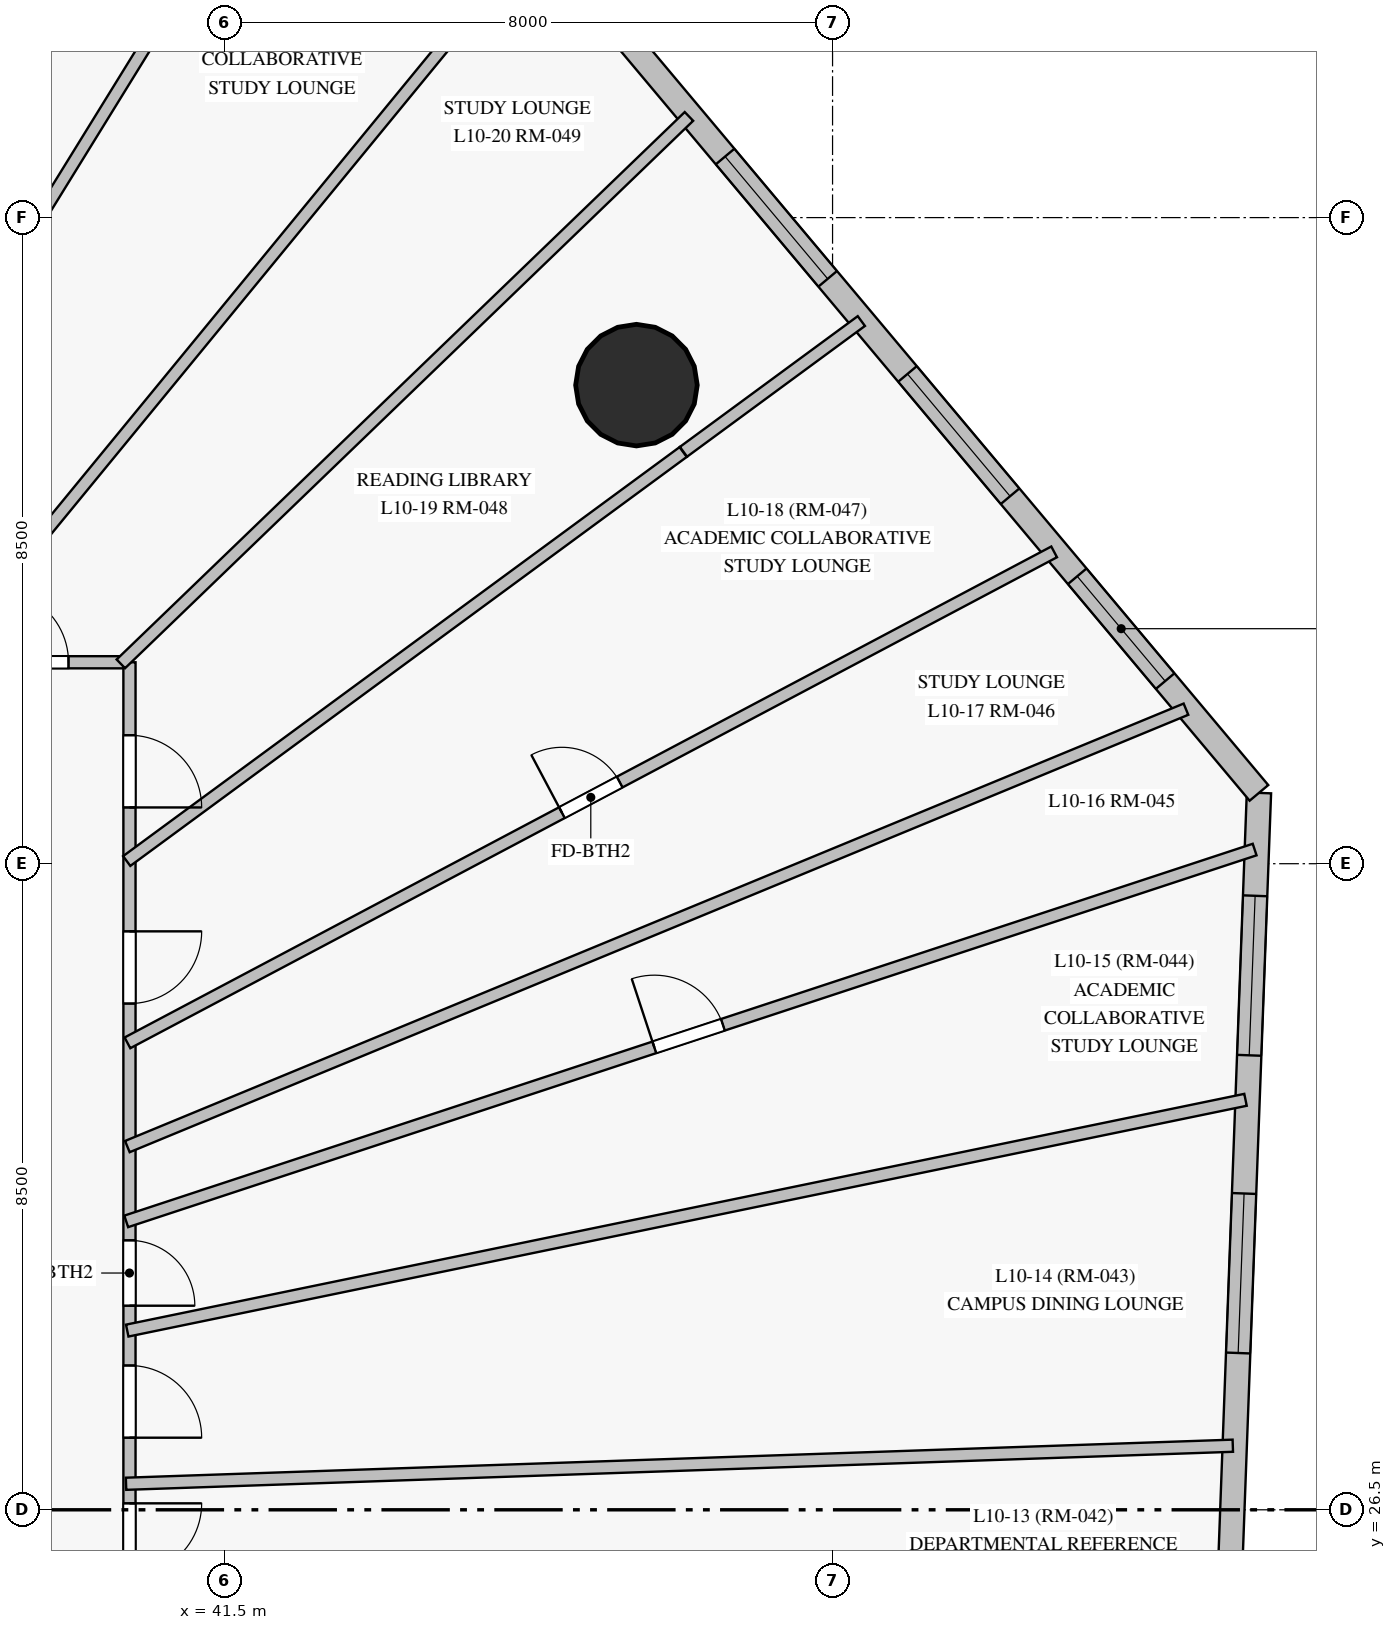
"""IFC4 building model, lengths in metres.
Left out: names, types, materials, properties, quantities, classifications, styles, units other than length and angle.
Written with IfcOpenShell. Run it as: python <this file> out.ifc"""

import sys

from ifc_helpers import new_model, si_unit, direction, frame, frame_2d, origin, origin_with_axes, origin_2d, place, context, subcontext, project, spatial, rectangle, circle, extrude, source, transform, mapped, element, fill, save


model = new_model("IFC4")
c1 = context("Model", 3, precision=1e-05, world=origin(), true_north=direction((0.0, 1.0)))
c2 = subcontext(c1, "Body", "Model", "MODEL_VIEW")
j1 = project(units=[si_unit("LENGTHUNIT", "METRE"), si_unit("PLANEANGLEUNIT", "RADIAN")], contexts=[c1])
p1 = place(None, origin())
s1 = spatial("IfcSite", under=j1, at=p1, CompositionType="ELEMENT")
p2 = place(p1, origin())
s2 = spatial("IfcBuilding", under=s1, at=p2, CompositionType="ELEMENT")
p3 = place(p2, frame((0.0, 0.0, 40.9)))
s3 = spatial("IfcBuildingStorey", under=s2, at=p3, CompositionType="ELEMENT", Elevation=40.9)
m1 = source(origin_with_axes(), c2, "Body", "SweptSolid", [
    extrude(circle(Radius=0.8, at=origin_2d()), origin(), (0.0, 0.0, 1.0), 3.6),
])
p4 = place(p3, frame((46.92, 41.296, 0.0), z_axis=(0.0, 0.0, 1.0), x_axis=(1.0, 0.0, 0.0)))
e1 = element("IfcColumn", 1, at=p4, inside=s3, PredefinedType="COLUMN", context=c2, shape_type="MappedRepresentation", body=[
    mapped(m1, transform((0.0, 0.0, 0.0), scale=1.0)),
])
p5 = place(p3, frame((54.716, 25.32, 0.0), z_axis=(0.0, 0.0, 1.0), x_axis=(0.037084791295, 0.99931212254, 0.0)))
e2 = element("IfcWall", 2, at=p5, inside=s3, PredefinedType="SOLIDWALL", context=c2, shape_type="SweptSolid", body=[
    extrude(rectangle(XDim=10.619, YDim=0.32, at=frame_2d((5.31, 0.0))), origin(), (0.0, 0.0, 1.0), 3.35),
])
p6 = place(p5, frame((3.245, 0.0, 0.85)))
e3 = element("IfcOpeningElement", 3, at=p6, cuts=e2, PredefinedType="OPENING", context=c2, shape_type="SweptSolid", body=[
    extrude(rectangle(XDim=2.1, YDim=1.95, at=frame_2d((1.05, 0.975))), frame((0.0, 0.17, 0.0), z_axis=(0.0, -1.0, 0.0), x_axis=(1.0, 0.0, 0.0)), (0.0, 0.0, 1.0), 0.34),
])
p7 = place(p5, frame((7.164, 0.0, 0.85)))
e4 = element("IfcOpeningElement", 4, at=p7, cuts=e2, PredefinedType="OPENING", context=c2, shape_type="SweptSolid", body=[
    extrude(rectangle(XDim=2.1, YDim=1.95, at=frame_2d((1.05, 0.975))), frame((0.0, 0.17, 0.0), z_axis=(0.0, -1.0, 0.0), x_axis=(1.0, 0.0, 0.0)), (0.0, 0.0, 1.0), 0.34),
])
p8 = place(p3, frame((55.11, 35.932, 0.0), z_axis=(0.0, 0.0, 1.0), x_axis=(-0.642710935311, 0.766108774021, 0.0)))
e5 = element("IfcWall", 5, at=p8, inside=s3, PredefinedType="SOLIDWALL", context=c2, shape_type="SweptSolid", body=[
    extrude(rectangle(XDim=13.212, YDim=0.32, at=frame_2d((6.606, 0.0))), origin(), (0.0, 0.0, 1.0), 3.35),
])
p9 = place(p8, frame((1.92, 0.0, 0.85)))
e6 = element("IfcOpeningElement", 6, at=p9, cuts=e5, PredefinedType="OPENING", context=c2, shape_type="SweptSolid", body=[
    extrude(rectangle(XDim=1.8, YDim=1.85, at=frame_2d((0.9, 0.925))), frame((0.0, 0.17, 0.0), z_axis=(0.0, -1.0, 0.0), x_axis=(1.0, 0.0, 0.0)), (0.0, 0.0, 1.0), 0.34),
])
p10 = place(p8, frame((5.094, 0.0, 0.85)))
e7 = element("IfcOpeningElement", 7, at=p10, cuts=e5, PredefinedType="OPENING", context=c2, shape_type="SweptSolid", body=[
    extrude(rectangle(XDim=2.1, YDim=1.95, at=frame_2d((1.05, 0.975))), frame((0.0, 0.17, 0.0), z_axis=(0.0, -1.0, 0.0), x_axis=(1.0, 0.0, 0.0)), (0.0, 0.0, 1.0), 0.34),
])
p11 = place(p8, frame((8.828, 0.0, 0.85)))
e8 = element("IfcOpeningElement", 8, at=p11, cuts=e5, PredefinedType="OPENING", context=c2, shape_type="SweptSolid", body=[
    extrude(rectangle(XDim=2.1, YDim=1.95, at=frame_2d((1.05, 0.975))), frame((0.0, 0.17, 0.0), z_axis=(0.0, -1.0, 0.0), x_axis=(1.0, 0.0, 0.0)), (0.0, 0.0, 1.0), 0.34),
])
p12 = place(p3, frame((10.5, 37.65, 0.0), z_axis=(0.0, 0.0, 1.0), x_axis=(1.0, 0.0, 0.0)))
e9 = element("IfcWall", 9, at=p12, inside=s3, PredefinedType="PARTITIONING", context=c2, shape_type="SweptSolid", body=[
    extrude(rectangle(XDim=29.75, YDim=0.16, at=frame_2d((14.875, 0.0))), origin(), (0.0, 0.0, 1.0), 2.75),
])
p13 = place(p12, frame((27.998, 0.0, 0.0)))
e10 = element("IfcOpeningElement", 10, at=p13, cuts=e9, PredefinedType="OPENING", context=c2, shape_type="SweptSolid", body=[
    extrude(rectangle(XDim=0.95, YDim=2.15, at=frame_2d((0.475, 1.075))), frame((0.0, 0.09, 0.0), z_axis=(0.0, -1.0, 0.0), x_axis=(1.0, 0.0, 0.0)), (0.0, 0.0, 1.0), 0.18),
])
p14 = place(p12, frame((25.599, 0.0, 0.0)))
e11 = element("IfcOpeningElement", 11, at=p14, cuts=e9, PredefinedType="OPENING", context=c2, shape_type="SweptSolid", body=[
    extrude(rectangle(XDim=0.95, YDim=2.15, at=frame_2d((0.475, 1.075))), frame((0.0, 0.09, 0.0), z_axis=(0.0, -1.0, 0.0), x_axis=(1.0, 0.0, 0.0)), (0.0, 0.0, 1.0), 0.18),
])
p15 = place(p12, frame((23.319, 0.0, 0.0)))
e12 = element("IfcOpeningElement", 12, at=p15, cuts=e9, PredefinedType="OPENING", context=c2, shape_type="SweptSolid", body=[
    extrude(rectangle(XDim=0.95, YDim=2.15, at=frame_2d((0.475, 1.075))), frame((0.0, 0.09, 0.0), z_axis=(0.0, -1.0, 0.0), x_axis=(1.0, 0.0, 0.0)), (0.0, 0.0, 1.0), 0.18),
])
p16 = place(p12, frame((20.597, 0.0, 0.0)))
e13 = element("IfcOpeningElement", 13, at=p16, cuts=e9, PredefinedType="OPENING", context=c2, shape_type="SweptSolid", body=[
    extrude(rectangle(XDim=0.95, YDim=2.15, at=frame_2d((0.475, 1.075))), frame((0.0, 0.09, 0.0), z_axis=(0.0, -1.0, 0.0), x_axis=(1.0, 0.0, 0.0)), (0.0, 0.0, 1.0), 0.18),
])
p17 = place(p12, frame((18.611, 0.0, 0.0)))
e14 = element("IfcOpeningElement", 14, at=p17, cuts=e9, PredefinedType="OPENING", context=c2, shape_type="SweptSolid", body=[
    extrude(rectangle(XDim=0.95, YDim=2.15, at=frame_2d((0.475, 1.075))), frame((0.0, 0.09, 0.0), z_axis=(0.0, -1.0, 0.0), x_axis=(1.0, 0.0, 0.0)), (0.0, 0.0, 1.0), 0.18),
])
p18 = place(p12, frame((16.123, 0.0, 0.0)))
e15 = element("IfcOpeningElement", 15, at=p18, cuts=e9, PredefinedType="OPENING", context=c2, shape_type="SweptSolid", body=[
    extrude(rectangle(XDim=0.95, YDim=2.15, at=frame_2d((0.475, 1.075))), frame((0.0, 0.09, 0.0), z_axis=(0.0, -1.0, 0.0), x_axis=(1.0, 0.0, 0.0)), (0.0, 0.0, 1.0), 0.18),
])
p19 = place(p12, frame((12.996, 0.0, 0.0)))
e16 = element("IfcOpeningElement", 16, at=p19, cuts=e9, PredefinedType="OPENING", context=c2, shape_type="SweptSolid", body=[
    extrude(rectangle(XDim=0.95, YDim=2.15, at=frame_2d((0.475, 1.075))), frame((0.0, 0.09, 0.0), z_axis=(0.0, -1.0, 0.0), x_axis=(1.0, 0.0, 0.0)), (0.0, 0.0, 1.0), 0.18),
])
p20 = place(p12, frame((10.46, 0.0, 0.0)))
e17 = element("IfcOpeningElement", 17, at=p20, cuts=e9, PredefinedType="OPENING", context=c2, shape_type="SweptSolid", body=[
    extrude(rectangle(XDim=0.95, YDim=2.15, at=frame_2d((0.475, 1.075))), frame((0.0, 0.09, 0.0), z_axis=(0.0, -1.0, 0.0), x_axis=(1.0, 0.0, 0.0)), (0.0, 0.0, 1.0), 0.18),
])
p21 = place(p12, frame((7.876, 0.0, 0.0)))
e18 = element("IfcOpeningElement", 18, at=p21, cuts=e9, PredefinedType="OPENING", context=c2, shape_type="SweptSolid", body=[
    extrude(rectangle(XDim=0.95, YDim=2.15, at=frame_2d((0.475, 1.075))), frame((0.0, 0.09, 0.0), z_axis=(0.0, -1.0, 0.0), x_axis=(1.0, 0.0, 0.0)), (0.0, 0.0, 1.0), 0.18),
])
p22 = place(p12, frame((6.748, 0.0, 0.0)))
e19 = element("IfcOpeningElement", 19, at=p22, cuts=e9, PredefinedType="OPENING", context=c2, shape_type="SweptSolid", body=[
    extrude(rectangle(XDim=0.95, YDim=2.15, at=frame_2d((0.475, 1.075))), frame((0.0, 0.09, 0.0), z_axis=(0.0, -1.0, 0.0), x_axis=(1.0, 0.0, 0.0)), (0.0, 0.0, 1.0), 0.18),
])
p23 = place(p12, frame((5.623, 0.0, 0.0)))
e20 = element("IfcOpeningElement", 20, at=p23, cuts=e9, PredefinedType="OPENING", context=c2, shape_type="SweptSolid", body=[
    extrude(rectangle(XDim=0.95, YDim=2.15, at=frame_2d((0.475, 1.075))), frame((0.0, 0.09, 0.0), z_axis=(0.0, -1.0, 0.0), x_axis=(1.0, 0.0, 0.0)), (0.0, 0.0, 1.0), 0.18),
])
p24 = place(p3, frame((40.25, 37.65, 0.0), z_axis=(0.0, 0.0, 1.0), x_axis=(0.0, -1.0, 0.0)))
e21 = element("IfcWall", 21, at=p24, inside=s3, PredefinedType="PARTITIONING", context=c2, shape_type="SweptSolid", body=[
    extrude(rectangle(XDim=22.3, YDim=0.16, at=frame_2d((11.15, 0.0))), origin(), (0.0, 0.0, 1.0), 2.75),
])
p25 = place(p24, frame((16.34, 0.0, 0.0)))
e22 = element("IfcOpeningElement", 22, at=p25, cuts=e21, PredefinedType="OPENING", context=c2, shape_type="SweptSolid", body=[
    extrude(rectangle(XDim=0.95, YDim=2.15, at=frame_2d((0.475, 1.075))), frame((0.0, 0.09, 0.0), z_axis=(0.0, -1.0, 0.0), x_axis=(1.0, 0.0, 0.0)), (0.0, 0.0, 1.0), 0.18),
])
p26 = place(p24, frame((14.02, 0.0, 0.0)))
e23 = element("IfcOpeningElement", 23, at=p26, cuts=e21, PredefinedType="OPENING", context=c2, shape_type="SweptSolid", body=[
    extrude(rectangle(XDim=0.95, YDim=2.15, at=frame_2d((0.475, 1.075))), frame((0.0, 0.09, 0.0), z_axis=(0.0, -1.0, 0.0), x_axis=(1.0, 0.0, 0.0)), (0.0, 0.0, 1.0), 0.18),
])
p27 = place(p24, frame((11.065, 0.0, 0.0)))
e24 = element("IfcOpeningElement", 24, at=p27, cuts=e21, PredefinedType="OPENING", context=c2, shape_type="SweptSolid", body=[
    extrude(rectangle(XDim=0.95, YDim=2.15, at=frame_2d((0.475, 1.075))), frame((0.0, 0.09, 0.0), z_axis=(0.0, -1.0, 0.0), x_axis=(1.0, 0.0, 0.0)), (0.0, 0.0, 1.0), 0.18),
])
p28 = place(p24, frame((9.252, 0.0, 0.0)))
e25 = element("IfcOpeningElement", 25, at=p28, cuts=e21, PredefinedType="OPENING", context=c2, shape_type="SweptSolid", body=[
    extrude(rectangle(XDim=0.95, YDim=2.15, at=frame_2d((0.475, 1.075))), frame((0.0, 0.09, 0.0), z_axis=(0.0, -1.0, 0.0), x_axis=(1.0, 0.0, 0.0)), (0.0, 0.0, 1.0), 0.18),
])
p29 = place(p24, frame((3.54, 0.0, 0.0)))
e26 = element("IfcOpeningElement", 26, at=p29, cuts=e21, PredefinedType="OPENING", context=c2, shape_type="SweptSolid", body=[
    extrude(rectangle(XDim=0.95, YDim=2.15, at=frame_2d((0.475, 1.075))), frame((0.0, 0.09, 0.0), z_axis=(0.0, -1.0, 0.0), x_axis=(1.0, 0.0, 0.0)), (0.0, 0.0, 1.0), 0.18),
])
p30 = place(p24, frame((0.96, 0.0, 0.0)))
e27 = element("IfcOpeningElement", 27, at=p30, cuts=e21, PredefinedType="OPENING", context=c2, shape_type="SweptSolid", body=[
    extrude(rectangle(XDim=0.95, YDim=2.15, at=frame_2d((0.475, 1.075))), frame((0.0, 0.09, 0.0), z_axis=(0.0, -1.0, 0.0), x_axis=(1.0, 0.0, 0.0)), (0.0, 0.0, 1.0), 0.18),
])
p31 = place(p24, frame((12.837, 0.0, 0.0)))
e28 = element("IfcOpeningElement", 28, at=p31, cuts=e21, PredefinedType="OPENING", context=c2, shape_type="SweptSolid", body=[
    extrude(rectangle(XDim=0.95, YDim=2.15, at=frame_2d((0.475, 1.075))), frame((0.0, 0.09, 0.0), z_axis=(0.0, -1.0, 0.0), x_axis=(1.0, 0.0, 0.0)), (0.0, 0.0, 1.0), 0.18),
])
p32 = place(p24, frame((17.465, 0.0, 0.0)))
e29 = element("IfcOpeningElement", 29, at=p32, cuts=e21, PredefinedType="OPENING", context=c2, shape_type="SweptSolid", body=[
    extrude(rectangle(XDim=0.95, YDim=2.15, at=frame_2d((0.475, 1.075))), frame((0.0, 0.09, 0.0), z_axis=(0.0, -1.0, 0.0), x_axis=(1.0, 0.0, 0.0)), (0.0, 0.0, 1.0), 0.18),
])
p33 = place(p24, frame((7.605, 0.0, 0.0)))
e30 = element("IfcOpeningElement", 30, at=p33, cuts=e21, PredefinedType="OPENING", context=c2, shape_type="SweptSolid", body=[
    extrude(rectangle(XDim=0.86, YDim=2.04, at=frame_2d((0.43, 1.02))), frame((0.0, 0.09, 0.0), z_axis=(0.0, -1.0, 0.0), x_axis=(1.0, 0.0, 0.0)), (0.0, 0.0, 1.0), 0.18),
])
p34 = place(p3, frame((40.207, 30.294, 0.0), z_axis=(0.0, 0.0, 1.0), x_axis=(0.949766327696, 0.31295993797, 0.0)))
e31 = element("IfcWall", 31, at=p34, inside=s3, PredefinedType="PARTITIONING", context=c2, shape_type="SweptSolid", body=[
    extrude(rectangle(XDim=15.631, YDim=0.16, at=frame_2d((7.815, 0.0))), origin(), (0.0, 0.0, 1.0), 3.35),
])
p35 = place(p34, frame((7.315, 0.0, 0.0)))
e32 = element("IfcOpeningElement", 32, at=p35, cuts=e31, PredefinedType="OPENING", context=c2, shape_type="SweptSolid", body=[
    extrude(rectangle(XDim=0.95, YDim=2.15, at=frame_2d((0.475, 1.075))), frame((0.0, 0.09, 0.0), z_axis=(0.0, -1.0, 0.0), x_axis=(1.0, 0.0, 0.0)), (0.0, 0.0, 1.0), 0.18),
])
p36 = place(p3, frame((40.222, 31.278, 0.0), z_axis=(0.0, 0.0, 1.0), x_axis=(0.924216059617, 0.381869971517, 0.0)))
e33 = element("IfcWall", 33, at=p36, inside=s3, PredefinedType="PARTITIONING", context=c2, shape_type="SweptSolid", body=[
    extrude(rectangle(XDim=15.069, YDim=0.16, at=frame_2d((7.535, 0.0))), origin(), (0.0, 0.0, 1.0), 3.35),
])
p37 = place(p3, frame((40.221, 28.857, 0.0), z_axis=(0.0, 0.0, 1.0), x_axis=(0.979362809726, 0.202110086154, 0.0)))
e34 = element("IfcWall", 34, at=p37, inside=s3, PredefinedType="PARTITIONING", context=c2, shape_type="SweptSolid", body=[
    extrude(rectangle(XDim=15.022, YDim=0.16, at=frame_2d((7.511, 0.0))), origin(), (0.0, 0.0, 1.0), 3.35),
])
p38 = place(p3, frame((40.205, 26.842, 0.0), z_axis=(0.0, 0.0, 1.0), x_axis=(0.999409219027, 0.034368778327, 0.0)))
e35 = element("IfcWall", 35, at=p38, inside=s3, PredefinedType="PARTITIONING", context=c2, shape_type="SweptSolid", body=[
    extrude(rectangle(XDim=14.569, YDim=0.16, at=frame_2d((7.285, 0.0))), origin(), (0.0, 0.0, 1.0), 3.35),
])
p39 = place(p3, frame((40.223, 32.643, 0.0), z_axis=(0.0, 0.0, 1.0), x_axis=(0.88365057227, 0.46814705609, 0.0)))
e36 = element("IfcWall", 36, at=p39, inside=s3, PredefinedType="PARTITIONING", context=c2, shape_type="SweptSolid", body=[
    extrude(rectangle(XDim=13.797, YDim=0.16, at=frame_2d((6.898, 0.0))), origin(), (0.0, 0.0, 1.0), 3.35),
])
p40 = place(p39, frame((6.469, 0.0, 0.0)))
e37 = element("IfcOpeningElement", 37, at=p40, cuts=e36, PredefinedType="OPENING", context=c2, shape_type="SweptSolid", body=[
    extrude(rectangle(XDim=0.86, YDim=2.04, at=frame_2d((0.43, 1.02))), frame((0.0, 0.09, 0.0), z_axis=(0.0, -1.0, 0.0), x_axis=(1.0, 0.0, 0.0)), (0.0, 0.0, 1.0), 0.18),
])
p41 = place(p3, frame((35.432, 37.612, 0.0), z_axis=(0.0, 0.0, 1.0), x_axis=(0.525422876005, 0.850841231588, 0.0)))
e38 = element("IfcWall", 38, at=p41, inside=s3, PredefinedType="PARTITIONING", context=c2, shape_type="SweptSolid", body=[
    extrude(rectangle(XDim=12.029, YDim=0.16, at=frame_2d((6.014, 0.0))), origin(), (0.0, 0.0, 1.0), 3.35),
])
p42 = place(p3, frame((37.704, 37.615, 0.0), z_axis=(0.0, 0.0, 1.0), x_axis=(0.634552182482, 0.772880021547, 0.0)))
e39 = element("IfcWall", 39, at=p42, inside=s3, PredefinedType="PARTITIONING", context=c2, shape_type="SweptSolid", body=[
    extrude(rectangle(XDim=11.624, YDim=0.16, at=frame_2d((5.812, 0.0))), origin(), (0.0, 0.0, 1.0), 3.35),
])
p43 = place(p3, frame((40.137, 37.629, 0.0), z_axis=(0.0, 0.0, 1.0), x_axis=(0.720098619119, 0.693871730757, 0.0)))
e40 = element("IfcWall", 40, at=p43, inside=s3, PredefinedType="PARTITIONING", context=c2, shape_type="SweptSolid", body=[
    extrude(rectangle(XDim=10.379, YDim=0.16, at=frame_2d((5.19, 0.0))), origin(), (0.0, 0.0, 1.0), 3.35),
])
p44 = place(p3, frame((40.214, 35.035, 0.0), z_axis=(0.0, 0.0, 1.0), x_axis=(0.805769809624, 0.59222885264, 0.0)))
e41 = element("IfcWall", 41, at=p44, inside=s3, PredefinedType="PARTITIONING", context=c2, shape_type="SweptSolid", body=[
    extrude(rectangle(XDim=9.086, YDim=0.16, at=frame_2d((4.543, 0.0))), origin(), (0.0, 0.0, 1.0), 3.35),
])
p45 = place(p3, frame((47.539, 40.419, 0.0), z_axis=(0.0, 0.0, 1.0), x_axis=(0.805763100635, 0.592237980592, 0.0)))
e42 = element("IfcWall", 42, at=p45, inside=s3, PredefinedType="PARTITIONING", context=c2, shape_type="SweptSolid", body=[
    extrude(rectangle(XDim=2.904, YDim=0.16, at=frame_2d((1.452, 0.0))), origin(), (0.0, 0.0, 1.0), 3.35),
])
m2 = source(origin_with_axes(), c2, "Body", "SweptSolid", [
    extrude(rectangle(XDim=2.1, YDim=1.95, at=frame_2d((1.05, 0.975))), frame((0.0, 0.03, 0.0), z_axis=(0.0, -1.0, 0.0), x_axis=(1.0, 0.0, 0.0)), (0.0, 0.0, 1.0), 0.06),
])
p46 = place(p6, origin())
e43 = element("IfcWindow", 43, at=p46, inside=s3, PartitioningType="SINGLE_PANEL", PredefinedType="WINDOW", context=c2, shape_type="MappedRepresentation", body=[
    mapped(m2, transform((0.0, 0.0, 0.0), scale=1.0)),
])
fill(e3, e43)
p47 = place(p7, origin())
e44 = element("IfcWindow", 44, at=p47, inside=s3, PartitioningType="SINGLE_PANEL", PredefinedType="WINDOW", context=c2, shape_type="MappedRepresentation", body=[
    mapped(m2, transform((0.0, 0.0, 0.0), scale=1.0)),
])
fill(e4, e44)
m3 = source(origin_with_axes(), c2, "Body", "SweptSolid", [
    extrude(rectangle(XDim=1.8, YDim=1.85, at=frame_2d((0.9, 0.925))), frame((0.0, 0.03, 0.0), z_axis=(0.0, -1.0, 0.0), x_axis=(1.0, 0.0, 0.0)), (0.0, 0.0, 1.0), 0.06),
])
p48 = place(p9, origin())
e45 = element("IfcWindow", 45, at=p48, inside=s3, PartitioningType="SINGLE_PANEL", PredefinedType="WINDOW", context=c2, shape_type="MappedRepresentation", body=[
    mapped(m3, transform((0.0, 0.0, 0.0), scale=1.0)),
])
fill(e6, e45)
p49 = place(p10, origin())
e46 = element("IfcWindow", 46, at=p49, inside=s3, PartitioningType="SINGLE_PANEL", PredefinedType="WINDOW", context=c2, shape_type="MappedRepresentation", body=[
    mapped(m2, transform((0.0, 0.0, 0.0), scale=1.0)),
])
fill(e7, e46)
p50 = place(p11, origin())
e47 = element("IfcWindow", 47, at=p50, inside=s3, PartitioningType="SINGLE_PANEL", PredefinedType="WINDOW", context=c2, shape_type="MappedRepresentation", body=[
    mapped(m2, transform((0.0, 0.0, 0.0), scale=1.0)),
])
fill(e8, e47)
m4 = source(origin_with_axes(), c2, "Body", "SweptSolid", [
    extrude(rectangle(XDim=0.95, YDim=2.15, at=frame_2d((0.475, 1.075))), frame((0.0, 0.025, 0.0), z_axis=(0.0, -1.0, 0.0), x_axis=(1.0, 0.0, 0.0)), (0.0, 0.0, 1.0), 0.05),
])
p51 = place(p27, origin())
e48 = element("IfcDoor", 48, at=p51, inside=s3, OperationType="SINGLE_SWING_LEFT", PredefinedType="DOOR", context=c2, shape_type="MappedRepresentation", body=[
    mapped(m4, transform((0.0, 0.0, 0.0), scale=1.0)),
])
fill(e24, e48)
p52 = place(p28, origin())
e49 = element("IfcDoor", 49, at=p52, inside=s3, OperationType="SINGLE_SWING_RIGHT", PredefinedType="DOOR", context=c2, shape_type="MappedRepresentation", body=[
    mapped(m4, transform((0.0, 0.0, 0.0), scale=1.0)),
])
fill(e25, e49)
p53 = place(p29, origin())
e50 = element("IfcDoor", 50, at=p53, inside=s3, OperationType="SINGLE_SWING_LEFT", PredefinedType="DOOR", context=c2, shape_type="MappedRepresentation", body=[
    mapped(m4, transform((0.0, 0.0, 0.0), scale=1.0)),
])
fill(e26, e50)
p54 = place(p30, origin())
e51 = element("IfcDoor", 51, at=p54, inside=s3, OperationType="SINGLE_SWING_RIGHT", PredefinedType="DOOR", context=c2, shape_type="MappedRepresentation", body=[
    mapped(m4, transform((0.0, 0.0, 0.0), scale=1.0)),
])
fill(e27, e51)
p55 = place(p13, origin())
e52 = element("IfcDoor", 52, at=p55, inside=s3, OperationType="SINGLE_SWING_LEFT", PredefinedType="DOOR", context=c2, shape_type="MappedRepresentation", body=[
    mapped(m4, transform((0.0, 0.0, 0.0), scale=1.0)),
])
fill(e10, e52)
p56 = place(p35, origin())
e53 = element("IfcDoor", 53, at=p56, inside=s3, OperationType="SINGLE_SWING_LEFT", PredefinedType="DOOR", context=c2, shape_type="MappedRepresentation", body=[
    mapped(m4, transform((0.0, 0.0, 0.0), scale=1.0)),
])
fill(e32, e53)
m5 = source(origin_with_axes(), c2, "Body", "SweptSolid", [
    extrude(rectangle(XDim=0.86, YDim=2.04, at=frame_2d((0.43, 1.02))), frame((0.0, 0.025, 0.0), z_axis=(0.0, -1.0, 0.0), x_axis=(1.0, 0.0, 0.0)), (0.0, 0.0, 1.0), 0.05),
])
p57 = place(p33, origin())
e54 = element("IfcDoor", 54, at=p57, inside=s3, OperationType="SINGLE_SWING_RIGHT", PredefinedType="DOOR", context=c2, shape_type="MappedRepresentation", body=[
    mapped(m5, transform((0.0, 0.0, 0.0), scale=1.0)),
])
fill(e30, e54)
p58 = place(p40, origin())
e55 = element("IfcDoor", 55, at=p58, inside=s3, OperationType="SINGLE_SWING_LEFT", PredefinedType="DOOR", context=c2, shape_type="MappedRepresentation", body=[
    mapped(m5, transform((0.0, 0.0, 0.0), scale=1.0)),
])
fill(e37, e55)
save(model, sys.argv[1])
